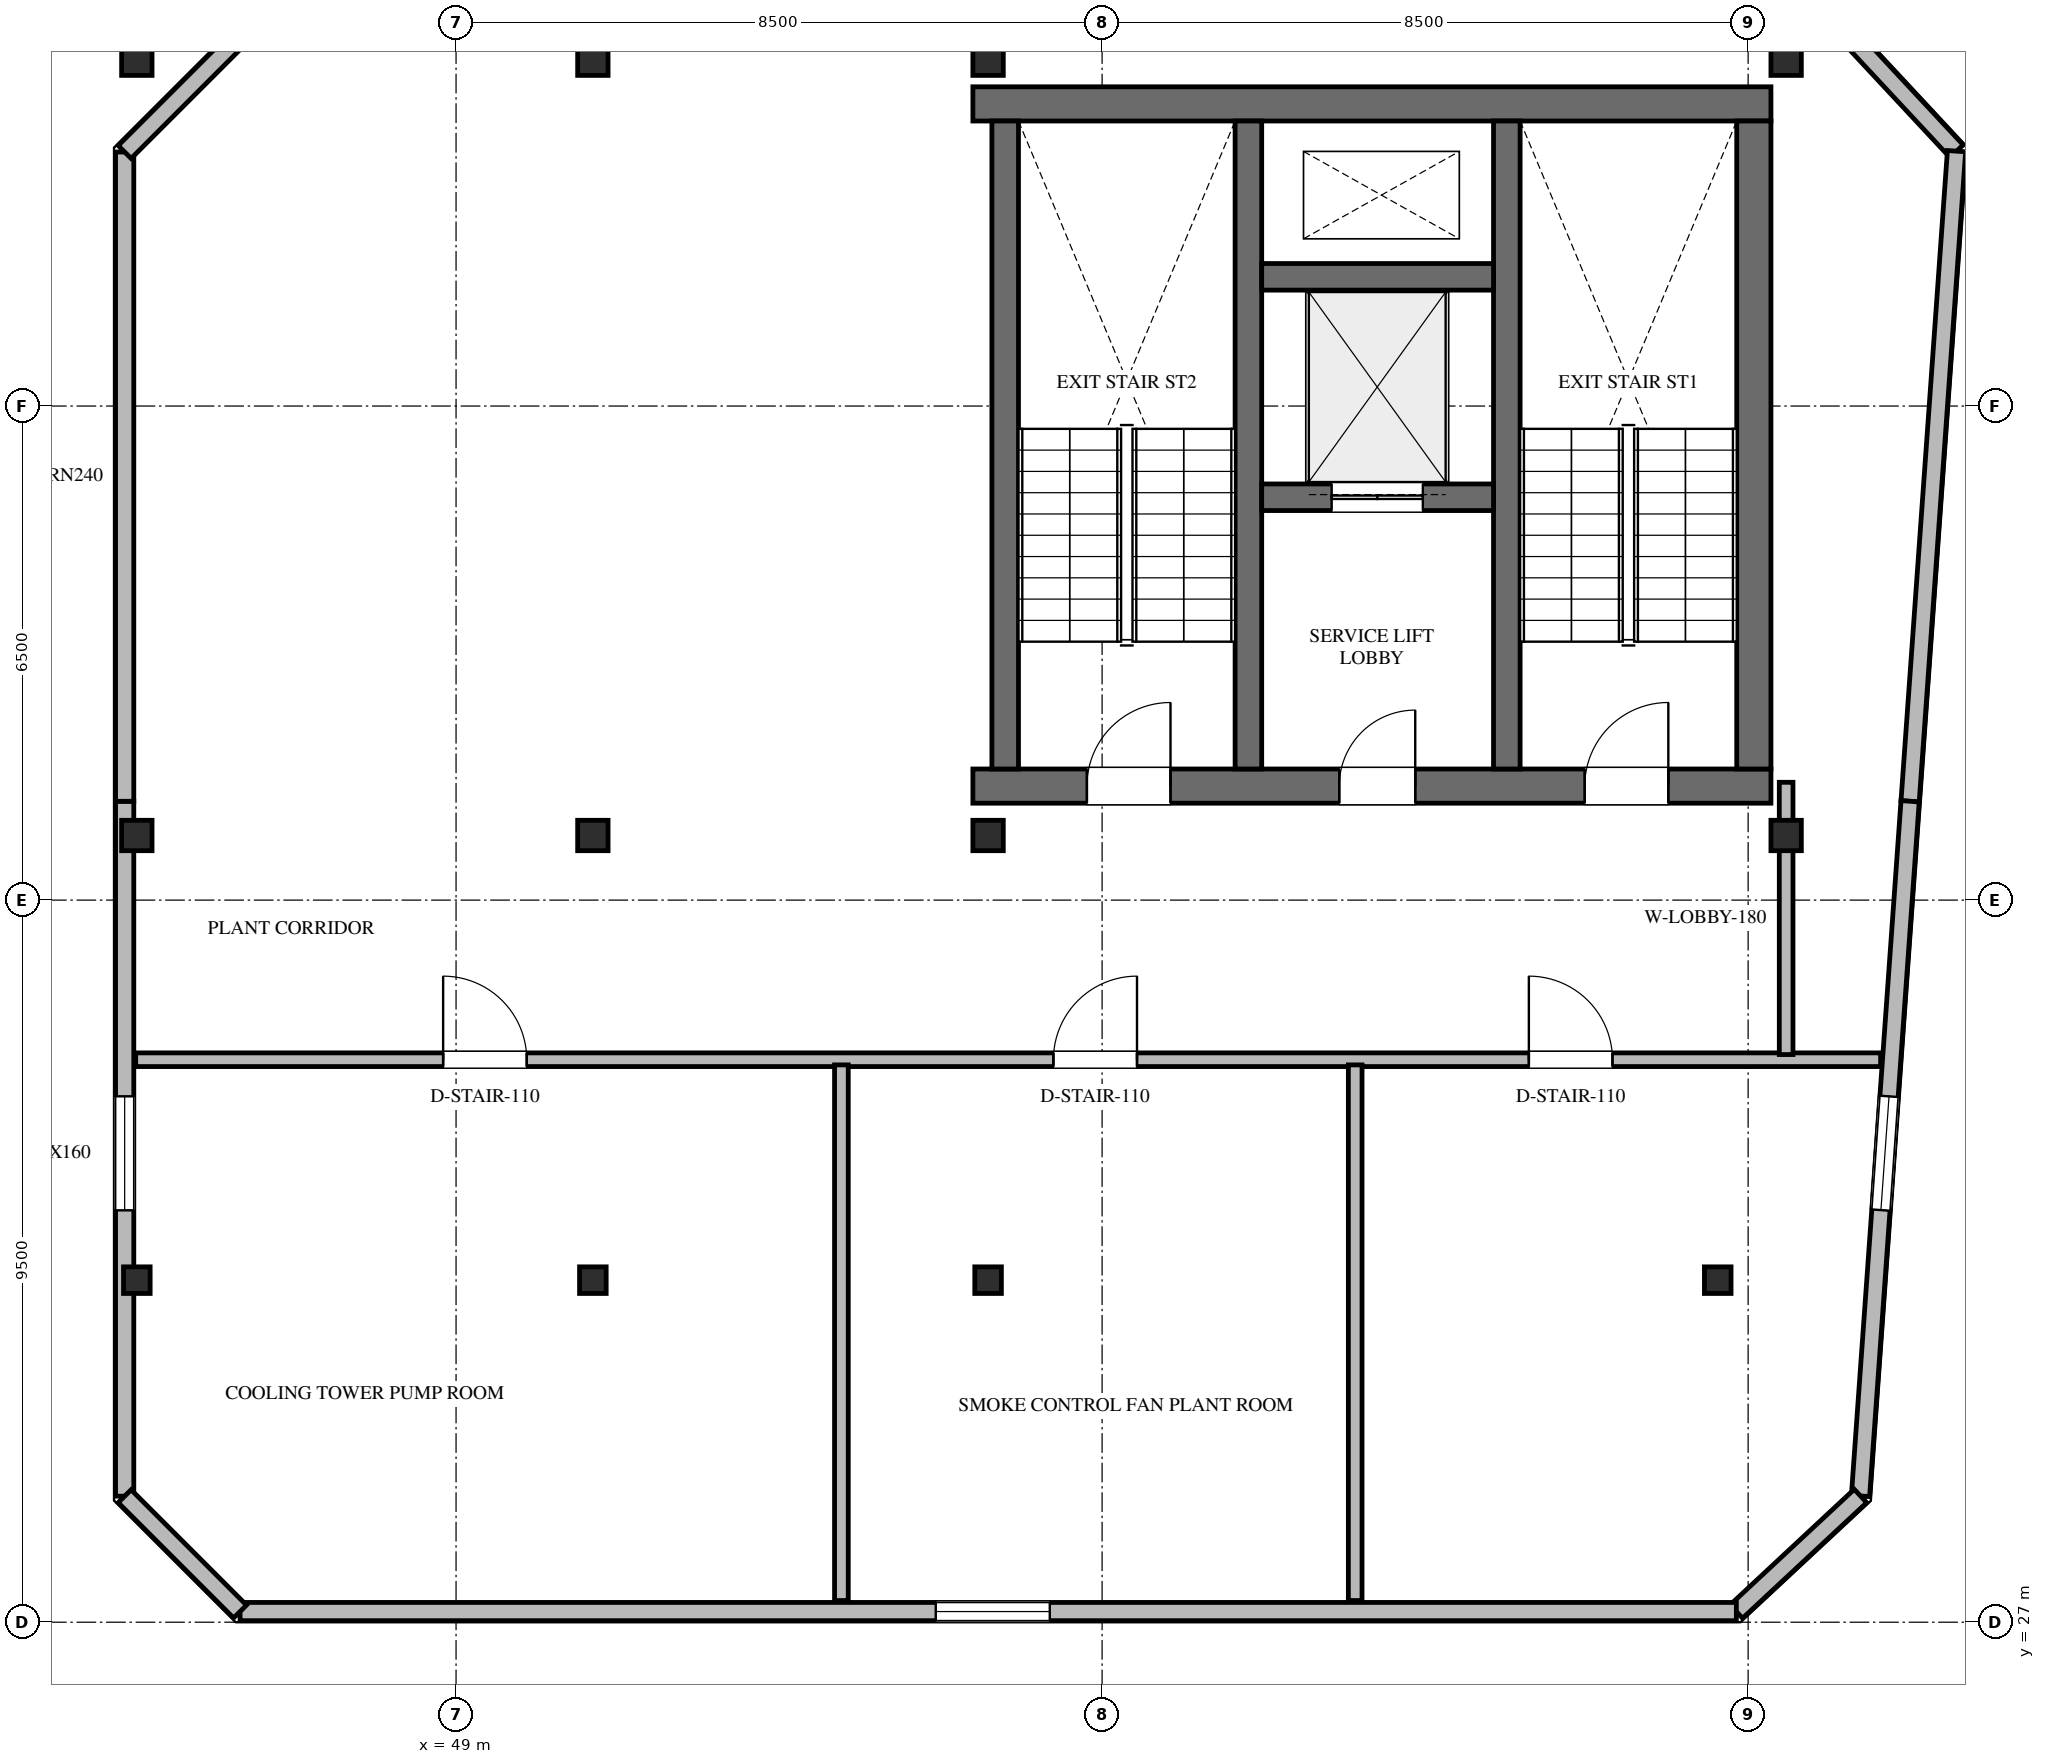
"""IFC4 building model, lengths in metres.
Left out: names, types, materials, properties, quantities, classifications, styles, units other than length and angle.
Written with IfcOpenShell. Run it as: python <this file> out.ifc"""

import sys

from ifc_helpers import new_model, si_unit, direction, frame, frame_2d, origin, origin_2d, place, context, subcontext, project, spatial, rectangle, hollow_rectangle, extrude, element, fill, save


model = new_model("IFC4")
c1 = context("Model", 3, precision=1e-05, world=origin(), true_north=direction((0.0, 1.0)))
c2 = subcontext(c1, "Body", "Model", "MODEL_VIEW")
j1 = project(units=[si_unit("LENGTHUNIT", "METRE"), si_unit("PLANEANGLEUNIT", "RADIAN")], contexts=[c1])
p1 = place(None, origin())
s1 = spatial("IfcSite", under=j1, at=p1, CompositionType="ELEMENT")
p2 = place(p1, origin())
s2 = spatial("IfcBuilding", under=s1, at=p2, CompositionType="ELEMENT")
p3 = place(p2, frame((0.0, 0.0, 319.2)))
s3 = spatial("IfcBuildingStorey", under=s2, at=p3, CompositionType="ELEMENT", Elevation=319.2)
p4 = place(p3, frame((55.8, 46.975, 0.0), z_axis=(0.0, 0.0, 1.0), x_axis=(1.0, 0.0, 0.0)))
e1 = element("IfcWall", 1, at=p4, inside=s3, PredefinedType="SHEAR", context=c2, shape_type="SweptSolid", body=[
    extrude(rectangle(XDim=10.5, YDim=0.45, at=frame_2d((5.25, 0.0))), origin(), (0.0, 0.0, 1.0), 3.6),
])
p5 = place(p3, frame((55.8, 38.0, 0.0), z_axis=(0.0, 0.0, 1.0), x_axis=(1.0, 0.0, 0.0)))
e2 = element("IfcWall", 2, at=p5, inside=s3, PredefinedType="SHEAR", context=c2, shape_type="SweptSolid", body=[
    extrude(rectangle(XDim=10.5, YDim=0.45, at=frame_2d((5.25, 0.0))), origin(), (0.0, 0.0, 1.0), 3.6),
])
p6 = place(p5, frame((1.5, 0.0, 0.0)))
e3 = element("IfcOpeningElement", 3, at=p6, cuts=e2, PredefinedType="OPENING", context=c2, shape_type="SweptSolid", body=[
    extrude(rectangle(XDim=1.1, YDim=2.2, at=frame_2d((0.55, 1.1))), frame((0.0, 0.235, 0.0), z_axis=(0.0, -1.0, 0.0), x_axis=(1.0, 0.0, 0.0)), (0.0, 0.0, 1.0), 0.47),
])
p7 = place(p5, frame((4.82, 0.0, 0.0)))
e4 = element("IfcOpeningElement", 4, at=p7, cuts=e2, PredefinedType="OPENING", context=c2, shape_type="SweptSolid", body=[
    extrude(rectangle(XDim=1.0, YDim=2.15, at=frame_2d((0.5, 1.075))), frame((0.0, 0.235, 0.0), z_axis=(0.0, -1.0, 0.0), x_axis=(1.0, 0.0, 0.0)), (0.0, 0.0, 1.0), 0.47),
])
p8 = place(p5, frame((8.05, 0.0, 0.0)))
e5 = element("IfcOpeningElement", 5, at=p8, cuts=e2, PredefinedType="OPENING", context=c2, shape_type="SweptSolid", body=[
    extrude(rectangle(XDim=1.1, YDim=2.2, at=frame_2d((0.55, 1.1))), frame((0.0, 0.235, 0.0), z_axis=(0.0, -1.0, 0.0), x_axis=(1.0, 0.0, 0.0)), (0.0, 0.0, 1.0), 0.47),
])
p9 = place(p3, frame((66.075, 38.225, 0.0), z_axis=(0.0, 0.0, 1.0), x_axis=(0.0, 1.0, 0.0)))
e6 = element("IfcWall", 6, at=p9, inside=s3, PredefinedType="SHEAR", context=c2, shape_type="SweptSolid", body=[
    extrude(rectangle(XDim=8.525, YDim=0.45, at=frame_2d((4.262, 0.0))), origin(), (0.0, 0.0, 1.0), 3.6),
])
for number, where, z_axis, x_axis in (
    (7, (62.825, 38.225, 0.0), (0.0, 0.0, 1.0), (0.0, 1.0, 0.0)),
    (8, (59.425, 38.225, 0.0), (0.0, 0.0, 1.0), (0.0, 1.0, 0.0)),
    (9, (56.225, 38.225, 0.0), (0.0, 0.0, 1.0), (0.0, 1.0, 0.0)),
):
    element("IfcWall", number, at=place(p3, frame(where, z_axis=z_axis, x_axis=x_axis)), inside=s3, PredefinedType="SHEAR", context=c2, shape_type="SweptSolid", body=[
        extrude(rectangle(XDim=8.525, YDim=0.35, at=frame_2d((4.262, 0.0))), origin(), (0.0, 0.0, 1.0), 3.6),
    ])
p10 = place(p3, frame((59.6, 41.8, 0.0), z_axis=(0.0, 0.0, 1.0), x_axis=(1.0, 0.0, 0.0)))
e10 = element("IfcWall", 10, at=p10, inside=s3, PredefinedType="SHEAR", context=c2, shape_type="SweptSolid", body=[
    extrude(rectangle(XDim=3.05, YDim=0.35, at=frame_2d((1.525, 0.0))), origin(), (0.0, 0.0, 1.0), 3.6),
])
p11 = place(p10, frame((0.92, 0.0, 0.0)))
e11 = element("IfcOpeningElement", 11, at=p11, cuts=e10, PredefinedType="OPENING", context=c2, shape_type="SweptSolid", body=[
    extrude(rectangle(XDim=1.2, YDim=2.2, at=frame_2d((0.6, 1.1))), frame((0.0, 0.185, 0.0), z_axis=(0.0, -1.0, 0.0), x_axis=(1.0, 0.0, 0.0)), (0.0, 0.0, 1.0), 0.37),
])
p12 = place(p3, frame((59.6, 44.7, 0.0), z_axis=(0.0, 0.0, 1.0), x_axis=(1.0, 0.0, 0.0)))
e12 = element("IfcWall", 12, at=p12, inside=s3, PredefinedType="SHEAR", context=c2, shape_type="SweptSolid", body=[
    extrude(rectangle(XDim=3.05, YDim=0.35, at=frame_2d((1.525, 0.0))), origin(), (0.0, 0.0, 1.0), 3.6),
])
for number, where, z_axis, x_axis in (
    (13, (56.0, 31.5, 0.0), (0.0, 0.0, 1.0), (1.0, 0.0, 0.0)),
    (14, (65.6, 31.5, 0.0), (0.0, 0.0, 1.0), (1.0, 0.0, 0.0)),
    (15, (50.8, 31.5, 0.0), (0.0, 0.0, 1.0), (1.0, 0.0, 0.0)),
):
    element("IfcColumn", number, at=place(p3, frame(where, z_axis=z_axis, x_axis=x_axis)), inside=s3, PredefinedType="COLUMN", context=c2, shape_type="SweptSolid", body=[
        extrude(hollow_rectangle(XDim=0.35, YDim=0.35, WallThickness=0.016, at=origin_2d()), origin(), (0.0, 0.0, 1.0), 3.6),
    ])
p13 = place(p3, frame((44.8, 31.5, 0.0), z_axis=(0.0, 0.0, 1.0), x_axis=(1.0, 0.0, 0.0)))
e16 = element("IfcColumn", 16, at=p13, inside=s3, PredefinedType="COLUMN", context=c2, shape_type="SweptSolid", body=[
    extrude(hollow_rectangle(XDim=0.35, YDim=0.35, WallThickness=0.016, at=origin_2d()), origin(), (0.0, 0.0, 1.0), 3.575),
])
for number, where, z_axis, x_axis in (
    (17, (66.5, 47.55, 0.0), (0.0, 0.0, 1.0), (1.0, 0.0, 0.0)),
    (18, (56.0, 47.55, 0.0), (0.0, 0.0, 1.0), (1.0, 0.0, 0.0)),
    (19, (66.5, 37.35, 0.0), (0.0, 0.0, 1.0), (1.0, 0.0, 0.0)),
    (20, (56.0, 37.35, 0.0), (0.0, 0.0, 1.0), (1.0, 0.0, 0.0)),
    (21, (50.8, 47.55, 0.0), (0.0, 0.0, 1.0), (1.0, 0.0, 0.0)),
    (22, (50.8, 37.35, 0.0), (0.0, 0.0, 1.0), (1.0, 0.0, 0.0)),
):
    element("IfcColumn", number, at=place(p3, frame(where, z_axis=z_axis, x_axis=x_axis)), inside=s3, PredefinedType="COLUMN", context=c2, shape_type="SweptSolid", body=[
        extrude(hollow_rectangle(XDim=0.4, YDim=0.4, WallThickness=0.016, at=origin_2d()), origin(), (0.0, 0.0, 1.0), 3.6),
    ])
for number, where, z_axis, x_axis in (
    (23, (44.8, 37.35, 0.0), (0.0, 0.0, 1.0), (1.0, 0.0, 0.0)),
    (24, (44.8, 47.55, 0.0), (0.0, 0.0, 1.0), (1.0, 0.0, 0.0)),
):
    element("IfcColumn", number, at=place(p3, frame(where, z_axis=z_axis, x_axis=x_axis)), inside=s3, PredefinedType="COLUMN", context=c2, shape_type="SweptSolid", body=[
        extrude(hollow_rectangle(XDim=0.4, YDim=0.4, WallThickness=0.016, at=origin_2d()), origin(), (0.0, 0.0, 1.0), 3.575),
    ])
p14 = place(p3, frame((44.64, 28.658, 0.0), z_axis=(0.0, 0.0, 1.0), x_axis=(0.0, 1.0, 0.0)))
e25 = element("IfcWall", 25, at=p14, inside=s3, PredefinedType="STANDARD", context=c2, shape_type="SweptSolid", body=[
    extrude(rectangle(XDim=9.142, YDim=0.24, at=frame_2d((4.571, 0.0))), origin(), (0.0, 0.0, 1.0), 2.709),
])
p15 = place(p14, frame((3.76, 0.0, 0.9)))
e26 = element("IfcOpeningElement", 26, at=p15, cuts=e25, PredefinedType="OPENING", context=c2, shape_type="SweptSolid", body=[
    extrude(rectangle(XDim=1.5, YDim=1.6, at=frame_2d((0.75, 0.8))), frame((0.0, 0.13, 0.0), z_axis=(0.0, -1.0, 0.0), x_axis=(1.0, 0.0, 0.0)), (0.0, 0.0, 1.0), 0.26),
])
p16 = place(p3, frame((44.64, 37.8, 0.0), z_axis=(0.0, 0.0, 1.0), x_axis=(0.0, 1.0, 0.0)))
e27 = element("IfcWall", 27, at=p16, inside=s3, PredefinedType="STANDARD", context=c2, shape_type="SweptSolid", body=[
    extrude(rectangle(XDim=8.542, YDim=0.24, at=frame_2d((4.271, 0.0))), origin(), (0.0, 0.0, 1.0), 3.32),
])
p17 = place(p3, frame((44.64, 46.342, 0.0), z_axis=(0.0, 0.0, 1.0), x_axis=(0.707106781187, 0.707106781187, 0.0)))
e28 = element("IfcWall", 28, at=p17, inside=s3, PredefinedType="STANDARD", context=c2, shape_type="SweptSolid", body=[
    extrude(rectangle(XDim=2.147, YDim=0.24, at=frame_2d((1.073, 0.0))), origin(), (0.0, 0.0, 1.0), 3.32),
])
p18 = place(p3, frame((67.339, 47.86, 0.0), z_axis=(0.0, 0.0, 1.0), x_axis=(0.681396623146, -0.731914367918, 0.0)))
e29 = element("IfcWall", 29, at=p18, inside=s3, PredefinedType="STANDARD", context=c2, shape_type="SweptSolid", body=[
    extrude(rectangle(XDim=2.059, YDim=0.24, at=frame_2d((1.029, 0.0))), origin(), (0.0, 0.0, 1.0), 3.32),
])
p19 = place(p3, frame((68.742, 46.353, 0.0), z_axis=(0.0, 0.0, 1.0), x_axis=(-0.071234909984, -0.9974595669, 0.0)))
e30 = element("IfcWall", 30, at=p19, inside=s3, PredefinedType="STANDARD", context=c2, shape_type="SweptSolid", body=[
    extrude(rectangle(XDim=8.575, YDim=0.24, at=frame_2d((4.288, 0.0))), origin(), (0.0, 0.0, 1.0), 3.32),
])
p20 = place(p3, frame((68.131, 37.8, 0.0), z_axis=(0.0, 0.0, 1.0), x_axis=(-0.071250837206, -0.997458429308, 0.0)))
e31 = element("IfcWall", 31, at=p20, inside=s3, PredefinedType="STANDARD", context=c2, shape_type="SweptSolid", body=[
    extrude(rectangle(XDim=9.162, YDim=0.24, at=frame_2d((4.581, 0.0))), origin(), (0.0, 0.0, 1.0), 3.32),
])
p21 = place(p20, frame((3.892, 0.0, 0.9)))
e32 = element("IfcOpeningElement", 32, at=p21, cuts=e31, PredefinedType="OPENING", context=c2, shape_type="SweptSolid", body=[
    extrude(rectangle(XDim=1.5, YDim=1.6, at=frame_2d((0.75, 0.8))), frame((0.0, 0.13, 0.0), z_axis=(0.0, -1.0, 0.0), x_axis=(1.0, 0.0, 0.0)), (0.0, 0.0, 1.0), 0.26),
])
p22 = place(p3, frame((67.478, 28.661, 0.0), z_axis=(0.0, 0.0, 1.0), x_axis=(-0.731818720836, -0.681499346907, 0.0)))
e33 = element("IfcWall", 33, at=p22, inside=s3, PredefinedType="STANDARD", context=c2, shape_type="SweptSolid", body=[
    extrude(rectangle(XDim=2.232, YDim=0.24, at=frame_2d((1.116, 0.0))), origin(), (0.0, 0.0, 1.0), 3.32),
])
p23 = place(p3, frame((65.845, 27.14, 0.0), z_axis=(0.0, 0.0, 1.0), x_axis=(-1.0, 0.0, 0.0)))
e34 = element("IfcWall", 34, at=p23, inside=s3, PredefinedType="STANDARD", context=c2, shape_type="SweptSolid", body=[
    extrude(rectangle(XDim=19.687, YDim=0.24, at=frame_2d((9.844, 0.0))), origin(), (0.0, 0.0, 1.0), 3.32),
])
p24 = place(p23, frame((9.033, 0.0, 0.9)))
e35 = element("IfcOpeningElement", 35, at=p24, cuts=e34, PredefinedType="OPENING", context=c2, shape_type="SweptSolid", body=[
    extrude(rectangle(XDim=1.5, YDim=1.6, at=frame_2d((0.75, 0.8))), frame((0.0, 0.13, 0.0), z_axis=(0.0, -1.0, 0.0), x_axis=(1.0, 0.0, 0.0)), (0.0, 0.0, 1.0), 0.26),
])
p25 = place(p3, frame((46.158, 27.14, 0.0), z_axis=(0.0, 0.0, 1.0), x_axis=(-0.707106781187, 0.707106781187, 0.0)))
e36 = element("IfcWall", 36, at=p25, inside=s3, PredefinedType="STANDARD", context=c2, shape_type="SweptSolid", body=[
    extrude(rectangle(XDim=2.147, YDim=0.24, at=frame_2d((1.073, 0.0))), origin(), (0.0, 0.0, 1.0), 3.32),
])
p26 = place(p3, frame((44.785, 34.4, 0.0), z_axis=(0.0, 0.0, 1.0), x_axis=(1.0, 0.0, 0.0)))
e37 = element("IfcWall", 37, at=p26, inside=s3, PredefinedType="STANDARD", context=c2, shape_type="SweptSolid", body=[
    extrude(rectangle(XDim=22.958, YDim=0.18, at=frame_2d((11.479, 0.0))), origin(), (0.0, 0.0, 1.0), 2.709),
])
p27 = place(p26, frame((4.045, 0.0, 0.0)))
e38 = element("IfcOpeningElement", 38, at=p27, cuts=e37, PredefinedType="OPENING", context=c2, shape_type="SweptSolid", body=[
    extrude(rectangle(XDim=1.1, YDim=2.2, at=frame_2d((0.55, 1.1))), frame((0.0, 0.1, 0.0), z_axis=(0.0, -1.0, 0.0), x_axis=(1.0, 0.0, 0.0)), (0.0, 0.0, 1.0), 0.2),
])
p28 = place(p26, frame((12.074, 0.0, 0.0)))
e39 = element("IfcOpeningElement", 39, at=p28, cuts=e37, PredefinedType="OPENING", context=c2, shape_type="SweptSolid", body=[
    extrude(rectangle(XDim=1.1, YDim=2.2, at=frame_2d((0.55, 1.1))), frame((0.0, 0.1, 0.0), z_axis=(0.0, -1.0, 0.0), x_axis=(1.0, 0.0, 0.0)), (0.0, 0.0, 1.0), 0.2),
])
p29 = place(p26, frame((18.33, 0.0, 0.0)))
e40 = element("IfcOpeningElement", 40, at=p29, cuts=e37, PredefinedType="OPENING", context=c2, shape_type="SweptSolid", body=[
    extrude(rectangle(XDim=1.1, YDim=2.2, at=frame_2d((0.55, 1.1))), frame((0.0, 0.1, 0.0), z_axis=(0.0, -1.0, 0.0), x_axis=(1.0, 0.0, 0.0)), (0.0, 0.0, 1.0), 0.2),
])
p30 = place(p3, frame((66.5, 34.468, 0.0), z_axis=(0.0, 0.0, 1.0), x_axis=(0.0, 1.0, 0.0)))
e41 = element("IfcWall", 41, at=p30, inside=s3, PredefinedType="STANDARD", context=c2, shape_type="SweptSolid", body=[
    extrude(rectangle(XDim=3.582, YDim=0.18, at=frame_2d((1.791, 0.0))), origin(), (0.0, 0.0, 1.0), 2.709),
])
for number, where, z_axis, x_axis in (
    (42, (54.07, 27.285, 0.0), (0.0, 0.0, 1.0), (0.0, 1.0, 0.0)),
    (43, (60.83, 27.285, 0.0), (0.0, 0.0, 1.0), (0.0, 1.0, 0.0)),
):
    element("IfcWall", number, at=place(p3, frame(where, z_axis=z_axis, x_axis=x_axis)), inside=s3, PredefinedType="STANDARD", context=c2, shape_type="SweptSolid", body=[
        extrude(rectangle(XDim=7.047, YDim=0.18, at=frame_2d((3.523, 0.0))), origin(), (0.0, 0.0, 1.0), 2.709),
    ])
p31 = place(p15, origin())
e44 = element("IfcWindow", 44, at=p31, inside=s3, PartitioningType="SINGLE_PANEL", PredefinedType="WINDOW", context=c2, shape_type="SweptSolid", body=[
    extrude(rectangle(XDim=1.5, YDim=1.6, at=frame_2d((0.75, 0.8))), frame((0.0, 0.03, 0.0), z_axis=(0.0, -1.0, 0.0), x_axis=(1.0, 0.0, 0.0)), (0.0, 0.0, 1.0), 0.06),
])
fill(e26, e44)
p32 = place(p21, origin())
e45 = element("IfcWindow", 45, at=p32, inside=s3, PartitioningType="SINGLE_PANEL", PredefinedType="WINDOW", context=c2, shape_type="SweptSolid", body=[
    extrude(rectangle(XDim=1.5, YDim=1.6, at=frame_2d((0.75, 0.8))), frame((0.0, 0.03, 0.0), z_axis=(0.0, -1.0, 0.0), x_axis=(1.0, 0.0, 0.0)), (0.0, 0.0, 1.0), 0.06),
])
fill(e32, e45)
p33 = place(p24, origin())
e46 = element("IfcWindow", 46, at=p33, inside=s3, PartitioningType="SINGLE_PANEL", PredefinedType="WINDOW", context=c2, shape_type="SweptSolid", body=[
    extrude(rectangle(XDim=1.5, YDim=1.6, at=frame_2d((0.75, 0.8))), frame((0.0, 0.03, 0.0), z_axis=(0.0, -1.0, 0.0), x_axis=(1.0, 0.0, 0.0)), (0.0, 0.0, 1.0), 0.06),
])
fill(e35, e46)
p34 = place(p6, origin())
e47 = element("IfcDoor", 47, at=p34, inside=s3, OperationType="SINGLE_SWING_RIGHT", PredefinedType="DOOR", context=c2, shape_type="SweptSolid", body=[
    extrude(rectangle(XDim=1.1, YDim=2.2, at=frame_2d((0.55, 1.1))), frame((0.0, 0.025, 0.0), z_axis=(0.0, -1.0, 0.0), x_axis=(1.0, 0.0, 0.0)), (0.0, 0.0, 1.0), 0.05),
])
fill(e3, e47)
p35 = place(p7, origin())
e48 = element("IfcDoor", 48, at=p35, inside=s3, OperationType="SINGLE_SWING_RIGHT", PredefinedType="DOOR", context=c2, shape_type="SweptSolid", body=[
    extrude(rectangle(XDim=1.0, YDim=2.15, at=frame_2d((0.5, 1.075))), frame((0.0, 0.025, 0.0), z_axis=(0.0, -1.0, 0.0), x_axis=(1.0, 0.0, 0.0)), (0.0, 0.0, 1.0), 0.05),
])
fill(e4, e48)
p36 = place(p8, origin())
e49 = element("IfcDoor", 49, at=p36, inside=s3, OperationType="SINGLE_SWING_RIGHT", PredefinedType="DOOR", context=c2, shape_type="SweptSolid", body=[
    extrude(rectangle(XDim=1.1, YDim=2.2, at=frame_2d((0.55, 1.1))), frame((0.0, 0.025, 0.0), z_axis=(0.0, -1.0, 0.0), x_axis=(1.0, 0.0, 0.0)), (0.0, 0.0, 1.0), 0.05),
])
fill(e5, e49)
p37 = place(p11, origin())
e50 = element("IfcDoor", 50, at=p37, inside=s3, OperationType="DOUBLE_DOOR_SLIDING", PredefinedType="DOOR", context=c2, shape_type="SweptSolid", body=[
    extrude(rectangle(XDim=1.2, YDim=2.2, at=frame_2d((0.6, 1.1))), frame((0.0, 0.025, 0.0), z_axis=(0.0, -1.0, 0.0), x_axis=(1.0, 0.0, 0.0)), (0.0, 0.0, 1.0), 0.05),
])
fill(e11, e50)
p38 = place(p27, origin())
e51 = element("IfcDoor", 51, at=p38, inside=s3, OperationType="SINGLE_SWING_LEFT", PredefinedType="DOOR", context=c2, shape_type="SweptSolid", body=[
    extrude(rectangle(XDim=1.1, YDim=2.2, at=frame_2d((0.55, 1.1))), frame((0.0, 0.025, 0.0), z_axis=(0.0, -1.0, 0.0), x_axis=(1.0, 0.0, 0.0)), (0.0, 0.0, 1.0), 0.05),
])
fill(e38, e51)
p39 = place(p28, origin())
e52 = element("IfcDoor", 52, at=p39, inside=s3, OperationType="SINGLE_SWING_RIGHT", PredefinedType="DOOR", context=c2, shape_type="SweptSolid", body=[
    extrude(rectangle(XDim=1.1, YDim=2.2, at=frame_2d((0.55, 1.1))), frame((0.0, 0.025, 0.0), z_axis=(0.0, -1.0, 0.0), x_axis=(1.0, 0.0, 0.0)), (0.0, 0.0, 1.0), 0.05),
])
fill(e39, e52)
p40 = place(p29, origin())
e53 = element("IfcDoor", 53, at=p40, inside=s3, OperationType="SINGLE_SWING_LEFT", PredefinedType="DOOR", context=c2, shape_type="SweptSolid", body=[
    extrude(rectangle(XDim=1.1, YDim=2.2, at=frame_2d((0.55, 1.1))), frame((0.0, 0.025, 0.0), z_axis=(0.0, -1.0, 0.0), x_axis=(1.0, 0.0, 0.0)), (0.0, 0.0, 1.0), 0.05),
])
fill(e40, e53)
save(model, sys.argv[1])
